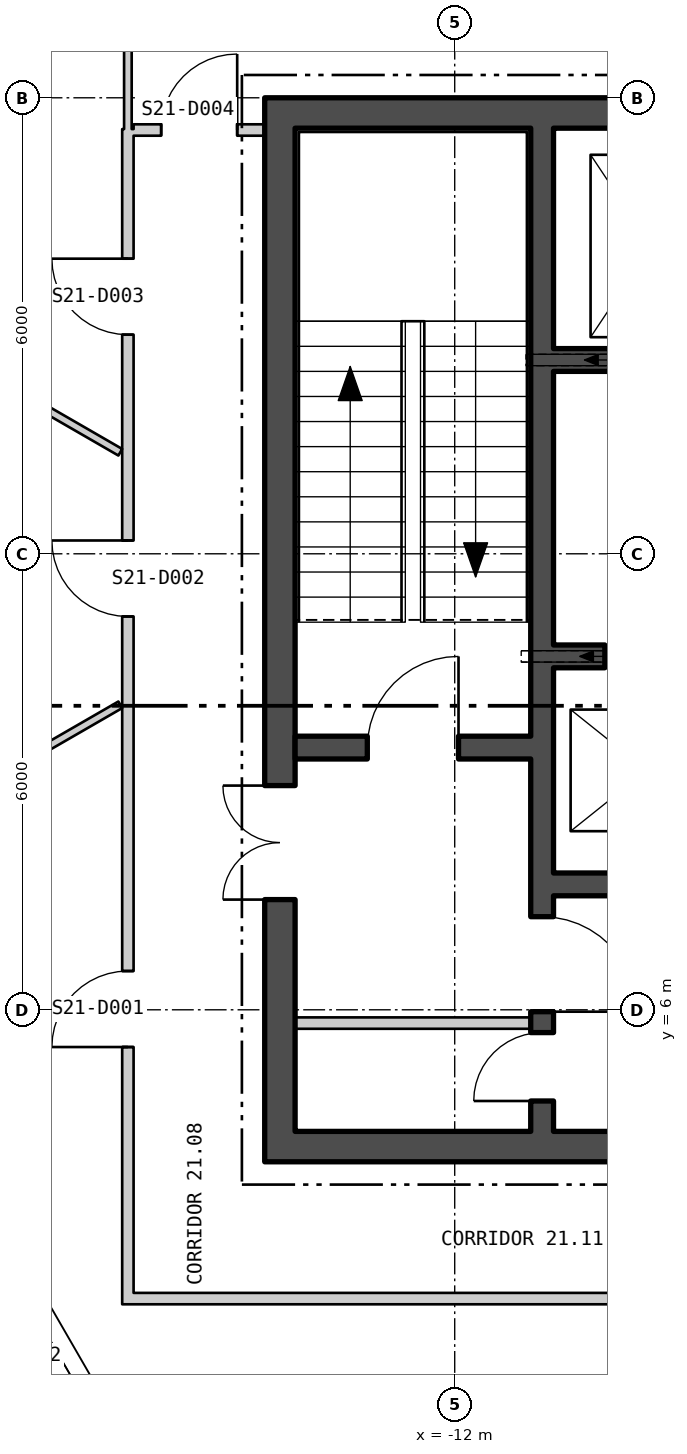
"""IFC4 building model, lengths in metres.
Left out: names, types, materials, properties, quantities, classifications, styles, units other than length and angle.
Written with IfcOpenShell. Run it as: python <this file> out.ifc"""

import sys

from ifc_helpers import new_model, si_unit, direction, frame, frame_2d, origin, place, context, subcontext, project, spatial, polyline, rectangle, outline, extrude, element, fill, save


model = new_model("IFC4")
c1 = context("Model", 3, precision=1e-05, world=origin(), true_north=direction((0.0, 1.0)))
c2 = subcontext(c1, "Body", "Model", "MODEL_VIEW")
j1 = project(units=[si_unit("LENGTHUNIT", "METRE"), si_unit("PLANEANGLEUNIT", "RADIAN")], contexts=[c1])
p1 = place(None, origin())
s1 = spatial("IfcSite", under=j1, at=p1, CompositionType="ELEMENT")
p2 = place(p1, origin())
s2 = spatial("IfcBuilding", under=s1, at=p2, CompositionType="ELEMENT")
p3 = place(p2, frame((0.0, 0.0, 280.5)))
s3 = spatial("IfcBuildingStorey", under=s2, at=p3, CompositionType="ELEMENT", Elevation=280.5)
p4 = place(p3, frame((-25.385, 15.619, -0.18), z_axis=(0.0, 0.0, 1.0), x_axis=(0.500000711659, -0.866024992908, 0.0)))
e1 = element("IfcWall", 1, at=p4, inside=s3, PredefinedType="SOLIDWALL", context=c2, shape_type="SweptSolid", body=[
    extrude(outline(polyline([(-0.13, -0.225), (45.87, -0.225), (45.61, 0.225), (0.13, 0.225), (-0.13, -0.225)])), origin(), (0.0, 0.0, 1.0), 3.68),
])
p5 = place(p4, frame((1.424, 0.0, 1.08)))
e2 = element("IfcOpeningElement", 2, at=p5, cuts=e1, PredefinedType="OPENING", context=c2, shape_type="SweptSolid", body=[
    extrude(rectangle(XDim=2.4, YDim=2.0, at=frame_2d((1.2, 1.0))), frame((0.0, 0.235, 0.0), z_axis=(0.0, -1.0, 0.0), x_axis=(1.0, 0.0, 0.0)), (0.0, 0.0, 1.0), 0.47),
])
p6 = place(p4, frame((5.893, 0.0, 1.08)))
e3 = element("IfcOpeningElement", 3, at=p6, cuts=e1, PredefinedType="OPENING", context=c2, shape_type="SweptSolid", body=[
    extrude(rectangle(XDim=2.4, YDim=2.0, at=frame_2d((1.2, 1.0))), frame((0.0, 0.235, 0.0), z_axis=(0.0, -1.0, 0.0), x_axis=(1.0, 0.0, 0.0)), (0.0, 0.0, 1.0), 0.47),
])
p7 = place(p4, frame((10.401, 0.0, 1.08)))
e4 = element("IfcOpeningElement", 4, at=p7, cuts=e1, PredefinedType="OPENING", context=c2, shape_type="SweptSolid", body=[
    extrude(rectangle(XDim=2.4, YDim=2.0, at=frame_2d((1.2, 1.0))), frame((0.0, 0.235, 0.0), z_axis=(0.0, -1.0, 0.0), x_axis=(1.0, 0.0, 0.0)), (0.0, 0.0, 1.0), 0.47),
])
p8 = place(p4, frame((14.909, 0.0, 1.08)))
e5 = element("IfcOpeningElement", 5, at=p8, cuts=e1, PredefinedType="OPENING", context=c2, shape_type="SweptSolid", body=[
    extrude(rectangle(XDim=2.4, YDim=2.0, at=frame_2d((1.2, 1.0))), frame((0.0, 0.235, 0.0), z_axis=(0.0, -1.0, 0.0), x_axis=(1.0, 0.0, 0.0)), (0.0, 0.0, 1.0), 0.47),
])
p9 = place(p4, frame((19.416, 0.0, 1.08)))
e6 = element("IfcOpeningElement", 6, at=p9, cuts=e1, PredefinedType="OPENING", context=c2, shape_type="SweptSolid", body=[
    extrude(rectangle(XDim=2.4, YDim=2.0, at=frame_2d((1.2, 1.0))), frame((0.0, 0.235, 0.0), z_axis=(0.0, -1.0, 0.0), x_axis=(1.0, 0.0, 0.0)), (0.0, 0.0, 1.0), 0.47),
])
p10 = place(p4, frame((23.924, 0.0, 1.08)))
e7 = element("IfcOpeningElement", 7, at=p10, cuts=e1, PredefinedType="OPENING", context=c2, shape_type="SweptSolid", body=[
    extrude(rectangle(XDim=2.4, YDim=2.0, at=frame_2d((1.2, 1.0))), frame((0.0, 0.235, 0.0), z_axis=(0.0, -1.0, 0.0), x_axis=(1.0, 0.0, 0.0)), (0.0, 0.0, 1.0), 0.47),
])
p11 = place(p4, frame((28.431, 0.0, 1.08)))
e8 = element("IfcOpeningElement", 8, at=p11, cuts=e1, PredefinedType="OPENING", context=c2, shape_type="SweptSolid", body=[
    extrude(rectangle(XDim=2.4, YDim=2.0, at=frame_2d((1.2, 1.0))), frame((0.0, 0.235, 0.0), z_axis=(0.0, -1.0, 0.0), x_axis=(1.0, 0.0, 0.0)), (0.0, 0.0, 1.0), 0.47),
])
p12 = place(p4, frame((32.939, 0.0, 1.08)))
e9 = element("IfcOpeningElement", 9, at=p12, cuts=e1, PredefinedType="OPENING", context=c2, shape_type="SweptSolid", body=[
    extrude(rectangle(XDim=2.4, YDim=2.0, at=frame_2d((1.2, 1.0))), frame((0.0, 0.235, 0.0), z_axis=(0.0, -1.0, 0.0), x_axis=(1.0, 0.0, 0.0)), (0.0, 0.0, 1.0), 0.47),
])
p13 = place(p4, frame((37.447, 0.0, 1.08)))
e10 = element("IfcOpeningElement", 10, at=p13, cuts=e1, PredefinedType="OPENING", context=c2, shape_type="SweptSolid", body=[
    extrude(rectangle(XDim=2.4, YDim=2.0, at=frame_2d((1.2, 1.0))), frame((0.0, 0.235, 0.0), z_axis=(0.0, -1.0, 0.0), x_axis=(1.0, 0.0, 0.0)), (0.0, 0.0, 1.0), 0.47),
])
p14 = place(p4, frame((41.916, 0.0, 1.08)))
e11 = element("IfcOpeningElement", 11, at=p14, cuts=e1, PredefinedType="OPENING", context=c2, shape_type="SweptSolid", body=[
    extrude(rectangle(XDim=2.4, YDim=2.0, at=frame_2d((1.2, 1.0))), frame((0.0, 0.235, 0.0), z_axis=(0.0, -1.0, 0.0), x_axis=(1.0, 0.0, 0.0)), (0.0, 0.0, 1.0), 0.47),
])
p15 = place(p3, frame((-14.5, 4.2, 0.0), z_axis=(0.0, 0.0, 1.0), x_axis=(1.0, 0.0, 0.0)))
e12 = element("IfcWall", 12, at=p15, inside=s3, PredefinedType="SHEAR", context=c2, shape_type="SweptSolid", body=[
    extrude(rectangle(XDim=29.0, YDim=0.4, at=frame_2d((14.5, 0.0))), origin(), (0.0, 0.0, 1.0), 3.7),
])
p16 = place(p15, frame((9.0, 0.0, 0.0)))
e13 = element("IfcOpeningElement", 13, at=p16, cuts=e12, PredefinedType="OPENING", context=c2, shape_type="SweptSolid", body=[
    extrude(rectangle(XDim=1.8, YDim=2.4, at=frame_2d((0.9, 1.2))), frame((0.0, 0.21, 0.0), z_axis=(0.0, -1.0, 0.0), x_axis=(1.0, 0.0, 0.0)), (0.0, 0.0, 1.0), 0.42),
])
p17 = place(p15, frame((19.0, 0.0, 0.0)))
e14 = element("IfcOpeningElement", 14, at=p17, cuts=e12, PredefinedType="OPENING", context=c2, shape_type="SweptSolid", body=[
    extrude(rectangle(XDim=1.8, YDim=2.4, at=frame_2d((0.9, 1.2))), frame((0.0, 0.21, 0.0), z_axis=(0.0, -1.0, 0.0), x_axis=(1.0, 0.0, 0.0)), (0.0, 0.0, 1.0), 0.42),
])
p18 = place(p3, frame((-14.5, 17.8, 0.0), z_axis=(0.0, 0.0, 1.0), x_axis=(1.0, 0.0, 0.0)))
e15 = element("IfcWall", 15, at=p18, inside=s3, PredefinedType="SHEAR", context=c2, shape_type="SweptSolid", body=[
    extrude(rectangle(XDim=29.0, YDim=0.4, at=frame_2d((14.5, 0.0))), origin(), (0.0, 0.0, 1.0), 3.7),
])
p19 = place(p3, frame((-14.3, 4.4, 0.0), z_axis=(0.0, 0.0, 1.0), x_axis=(0.0, 1.0, 0.0)))
e16 = element("IfcWall", 16, at=p19, inside=s3, PredefinedType="SHEAR", context=c2, shape_type="SweptSolid", body=[
    extrude(rectangle(XDim=13.2, YDim=0.4, at=frame_2d((6.6, 0.0))), origin(), (0.0, 0.0, 1.0), 3.7),
])
p20 = place(p19, frame((3.05, 0.0, 0.0)))
e17 = element("IfcOpeningElement", 17, at=p20, cuts=e16, PredefinedType="OPENING", context=c2, shape_type="SweptSolid", body=[
    extrude(rectangle(XDim=1.5, YDim=2.1, at=frame_2d((0.75, 1.05))), frame((0.0, 0.21, 0.0), z_axis=(0.0, -1.0, 0.0), x_axis=(1.0, 0.0, 0.0)), (0.0, 0.0, 1.0), 0.42),
])
p21 = place(p3, frame((-10.85, 4.4, 0.0), z_axis=(0.0, 0.0, 1.0), x_axis=(0.0, 1.0, 0.0)))
e18 = element("IfcWall", 18, at=p21, inside=s3, PredefinedType="SHEAR", context=c2, shape_type="SweptSolid", body=[
    extrude(rectangle(XDim=13.2, YDim=0.3, at=frame_2d((6.6, 0.0))), origin(), (0.0, 0.0, 1.0), 3.7),
])
p22 = place(p21, frame((1.575, 0.0, 0.0)))
e19 = element("IfcOpeningElement", 19, at=p22, cuts=e18, PredefinedType="OPENING", context=c2, shape_type="SweptSolid", body=[
    extrude(rectangle(XDim=1.25, YDim=2.1, at=frame_2d((0.625, 1.05))), frame((0.0, 0.16, 0.0), z_axis=(0.0, -1.0, 0.0), x_axis=(1.0, 0.0, 0.0)), (0.0, 0.0, 1.0), 0.32),
])
p23 = place(p21, frame((0.4, 0.0, 0.0)))
e20 = element("IfcOpeningElement", 20, at=p23, cuts=e18, PredefinedType="OPENING", context=c2, shape_type="SweptSolid", body=[
    extrude(rectangle(XDim=0.9, YDim=2.1, at=frame_2d((0.45, 1.05))), frame((0.0, 0.16, 0.0), z_axis=(0.0, -1.0, 0.0), x_axis=(1.0, 0.0, 0.0)), (0.0, 0.0, 1.0), 0.32),
])
p24 = place(p3, frame((-14.1, 9.45, 0.0), z_axis=(0.0, 0.0, 1.0), x_axis=(1.0, 0.0, 0.0)))
e21 = element("IfcWall", 21, at=p24, inside=s3, PredefinedType="SHEAR", context=c2, shape_type="SweptSolid", body=[
    extrude(rectangle(XDim=3.1, YDim=0.3, at=frame_2d((1.55, 0.0))), origin(), (0.0, 0.0, 1.0), 3.7),
])
p25 = place(p24, frame((0.95, 0.0, 0.0)))
e22 = element("IfcOpeningElement", 22, at=p25, cuts=e21, PredefinedType="OPENING", context=c2, shape_type="SweptSolid", body=[
    extrude(rectangle(XDim=1.2, YDim=2.1, at=frame_2d((0.6, 1.05))), frame((0.0, 0.16, 0.0), z_axis=(0.0, -1.0, 0.0), x_axis=(1.0, 0.0, 0.0)), (0.0, 0.0, 1.0), 0.32),
])
p26 = place(p3, frame((-10.7, 14.55, 0.0), z_axis=(0.0, 0.0, 1.0), x_axis=(1.0, 0.0, 0.0)))
e23 = element("IfcWall", 23, at=p26, inside=s3, PredefinedType="SHEAR", context=c2, shape_type="SweptSolid", body=[
    extrude(rectangle(XDim=21.4, YDim=0.3, at=frame_2d((10.7, 0.0))), origin(), (0.0, 0.0, 1.0), 3.7),
])
p27 = place(p26, frame((0.738, 0.0, 0.0)))
e24 = element("IfcOpeningElement", 24, at=p27, cuts=e23, PredefinedType="OPENING", context=c2, shape_type="SweptSolid", body=[
    extrude(rectangle(XDim=1.1, YDim=2.1, at=frame_2d((0.55, 1.05))), frame((0.0, 0.16, 0.0), z_axis=(0.0, -1.0, 0.0), x_axis=(1.0, 0.0, 0.0)), (0.0, 0.0, 1.0), 0.32),
])
p28 = place(p26, frame((3.462, 0.0, 0.0)))
e25 = element("IfcOpeningElement", 25, at=p28, cuts=e23, PredefinedType="OPENING", context=c2, shape_type="SweptSolid", body=[
    extrude(rectangle(XDim=1.1, YDim=2.1, at=frame_2d((0.55, 1.05))), frame((0.0, 0.16, 0.0), z_axis=(0.0, -1.0, 0.0), x_axis=(1.0, 0.0, 0.0)), (0.0, 0.0, 1.0), 0.32),
])
p29 = place(p26, frame((6.138, 0.0, 0.0)))
e26 = element("IfcOpeningElement", 26, at=p29, cuts=e23, PredefinedType="OPENING", context=c2, shape_type="SweptSolid", body=[
    extrude(rectangle(XDim=1.1, YDim=2.1, at=frame_2d((0.55, 1.05))), frame((0.0, 0.16, 0.0), z_axis=(0.0, -1.0, 0.0), x_axis=(1.0, 0.0, 0.0)), (0.0, 0.0, 1.0), 0.32),
])
p30 = place(p26, frame((8.812, 0.0, 0.0)))
e27 = element("IfcOpeningElement", 27, at=p30, cuts=e23, PredefinedType="OPENING", context=c2, shape_type="SweptSolid", body=[
    extrude(rectangle(XDim=1.1, YDim=2.1, at=frame_2d((0.55, 1.05))), frame((0.0, 0.16, 0.0), z_axis=(0.0, -1.0, 0.0), x_axis=(1.0, 0.0, 0.0)), (0.0, 0.0, 1.0), 0.32),
])
p31 = place(p26, frame((19.562, 0.0, 0.0)))
e28 = element("IfcOpeningElement", 28, at=p31, cuts=e23, PredefinedType="OPENING", context=c2, shape_type="SweptSolid", body=[
    extrude(rectangle(XDim=1.1, YDim=2.1, at=frame_2d((0.55, 1.05))), frame((0.0, 0.16, 0.0), z_axis=(0.0, -1.0, 0.0), x_axis=(1.0, 0.0, 0.0)), (0.0, 0.0, 1.0), 0.32),
])
p32 = place(p26, frame((11.537, 0.0, 0.0)))
e29 = element("IfcOpeningElement", 29, at=p32, cuts=e23, PredefinedType="OPENING", context=c2, shape_type="SweptSolid", body=[
    extrude(rectangle(XDim=1.0, YDim=2.1, at=frame_2d((0.5, 1.05))), frame((0.0, 0.16, 0.0), z_axis=(0.0, -1.0, 0.0), x_axis=(1.0, 0.0, 0.0)), (0.0, 0.0, 1.0), 0.32),
])
p33 = place(p26, frame((14.213, 0.0, 0.0)))
e30 = element("IfcOpeningElement", 30, at=p33, cuts=e23, PredefinedType="OPENING", context=c2, shape_type="SweptSolid", body=[
    extrude(rectangle(XDim=1.0, YDim=2.1, at=frame_2d((0.5, 1.05))), frame((0.0, 0.16, 0.0), z_axis=(0.0, -1.0, 0.0), x_axis=(1.0, 0.0, 0.0)), (0.0, 0.0, 1.0), 0.32),
])
p34 = place(p26, frame((16.887, 0.0, 0.0)))
e31 = element("IfcOpeningElement", 31, at=p34, cuts=e23, PredefinedType="OPENING", context=c2, shape_type="SweptSolid", body=[
    extrude(rectangle(XDim=1.0, YDim=2.1, at=frame_2d((0.5, 1.05))), frame((0.0, 0.16, 0.0), z_axis=(0.0, -1.0, 0.0), x_axis=(1.0, 0.0, 0.0)), (0.0, 0.0, 1.0), 0.32),
])
p35 = place(p3, frame((-10.7, 10.65, 0.0), z_axis=(0.0, 0.0, 1.0), x_axis=(1.0, 0.0, 0.0)))
e32 = element("IfcWall", 32, at=p35, inside=s3, PredefinedType="SHEAR", context=c2, shape_type="SweptSolid", body=[
    extrude(rectangle(XDim=10.3, YDim=0.3, at=frame_2d((5.15, 0.0))), origin(), (0.0, 0.0, 1.0), 3.7),
])
p36 = place(p35, frame((0.675, 0.0, 0.0)))
e33 = element("IfcOpeningElement", 33, at=p36, cuts=e32, PredefinedType="OPENING", context=c2, shape_type="SweptSolid", body=[
    extrude(rectangle(XDim=1.1, YDim=2.1, at=frame_2d((0.55, 1.05))), frame((0.0, 0.16, 0.0), z_axis=(0.0, -1.0, 0.0), x_axis=(1.0, 0.0, 0.0)), (0.0, 0.0, 1.0), 0.32),
])
p37 = place(p35, frame((3.275, 0.0, 0.0)))
e34 = element("IfcOpeningElement", 34, at=p37, cuts=e32, PredefinedType="OPENING", context=c2, shape_type="SweptSolid", body=[
    extrude(rectangle(XDim=1.1, YDim=2.1, at=frame_2d((0.55, 1.05))), frame((0.0, 0.16, 0.0), z_axis=(0.0, -1.0, 0.0), x_axis=(1.0, 0.0, 0.0)), (0.0, 0.0, 1.0), 0.32),
])
p38 = place(p35, frame((5.825, 0.0, 0.0)))
e35 = element("IfcOpeningElement", 35, at=p38, cuts=e32, PredefinedType="OPENING", context=c2, shape_type="SweptSolid", body=[
    extrude(rectangle(XDim=1.1, YDim=2.1, at=frame_2d((0.55, 1.05))), frame((0.0, 0.16, 0.0), z_axis=(0.0, -1.0, 0.0), x_axis=(1.0, 0.0, 0.0)), (0.0, 0.0, 1.0), 0.32),
])
p39 = place(p35, frame((8.425, 0.0, 0.0)))
e36 = element("IfcOpeningElement", 36, at=p39, cuts=e32, PredefinedType="OPENING", context=c2, shape_type="SweptSolid", body=[
    extrude(rectangle(XDim=1.0, YDim=2.1, at=frame_2d((0.5, 1.05))), frame((0.0, 0.16, 0.0), z_axis=(0.0, -1.0, 0.0), x_axis=(1.0, 0.0, 0.0)), (0.0, 0.0, 1.0), 0.32),
])
p40 = place(p3, frame((-10.7, 7.65, 0.0), z_axis=(0.0, 0.0, 1.0), x_axis=(1.0, 0.0, 0.0)))
e37 = element("IfcWall", 37, at=p40, inside=s3, PredefinedType="SHEAR", context=c2, shape_type="SweptSolid", body=[
    extrude(rectangle(XDim=10.3, YDim=0.3, at=frame_2d((5.15, 0.0))), origin(), (0.0, 0.0, 1.0), 3.7),
])
p41 = place(p3, frame((-14.1, 5.825, 0.0), z_axis=(0.0, 0.0, 1.0), x_axis=(1.0, 0.0, 0.0)))
e38 = element("IfcWall", 38, at=p41, inside=s3, PredefinedType="PARTITIONING", context=c2, shape_type="SweptSolid", body=[
    extrude(rectangle(XDim=3.1, YDim=0.15, at=frame_2d((1.55, 0.0))), origin(), (0.0, 0.0, 1.0), 3.7),
])
p42 = place(p3, frame((-20.127, 7.862, 0.0), z_axis=(0.0, 0.0, 1.0), x_axis=(0.866104329613, 0.499863271531, 0.0)))
e39 = element("IfcWall", 39, at=p42, inside=s3, PredefinedType="PARTITIONING", context=c2, shape_type="SweptSolid", body=[
    extrude(rectangle(XDim=4.303, YDim=0.1, at=frame_2d((2.152, 0.0))), origin(), (0.0, 0.0, 1.0), 3.7),
])
p43 = place(p3, frame((-17.971, 14.243, 0.0), z_axis=(0.0, 0.0, 1.0), x_axis=(0.86602952684, -0.49999285859, 0.0)))
e40 = element("IfcWall", 40, at=p43, inside=s3, PredefinedType="PARTITIONING", context=c2, shape_type="SweptSolid", body=[
    extrude(rectangle(XDim=1.814, YDim=0.1, at=frame_2d((0.907, 0.0))), origin(), (0.0, 0.0, 1.0), 3.7),
])
p44 = place(p3, frame((-16.3, 2.125, 0.0), z_axis=(0.0, 0.0, 1.0), x_axis=(0.0, 1.0, 0.0)))
e41 = element("IfcWall", 41, at=p44, inside=s3, PredefinedType="PARTITIONING", context=c2, shape_type="SweptSolid", body=[
    extrude(rectangle(XDim=15.463, YDim=0.15, at=frame_2d((7.731, 0.0))), origin(), (0.0, 0.0, 1.0), 3.7),
])
p45 = place(p44, frame((3.385, 0.0, 0.0)))
e42 = element("IfcOpeningElement", 42, at=p45, cuts=e41, PredefinedType="OPENING", context=c2, shape_type="SweptSolid", body=[
    extrude(rectangle(XDim=1.0, YDim=2.1, at=frame_2d((0.5, 1.05))), frame((0.0, 0.085, 0.0), z_axis=(0.0, -1.0, 0.0), x_axis=(1.0, 0.0, 0.0)), (0.0, 0.0, 1.0), 0.17),
])
p46 = place(p44, frame((9.05, 0.0, 0.0)))
e43 = element("IfcOpeningElement", 43, at=p46, cuts=e41, PredefinedType="OPENING", context=c2, shape_type="SweptSolid", body=[
    extrude(rectangle(XDim=1.0, YDim=2.1, at=frame_2d((0.5, 1.05))), frame((0.0, 0.085, 0.0), z_axis=(0.0, -1.0, 0.0), x_axis=(1.0, 0.0, 0.0)), (0.0, 0.0, 1.0), 0.17),
])
p47 = place(p44, frame((12.758, 0.0, 0.0)))
e44 = element("IfcOpeningElement", 44, at=p47, cuts=e41, PredefinedType="OPENING", context=c2, shape_type="SweptSolid", body=[
    extrude(rectangle(XDim=1.0, YDim=2.1, at=frame_2d((0.5, 1.05))), frame((0.0, 0.085, 0.0), z_axis=(0.0, -1.0, 0.0), x_axis=(1.0, 0.0, 0.0)), (0.0, 0.0, 1.0), 0.17),
])
p48 = place(p3, frame((-16.3, 17.588, 0.0), z_axis=(0.0, 0.0, 1.0), x_axis=(0.0, 1.0, 0.0)))
e45 = element("IfcWall", 45, at=p48, inside=s3, PredefinedType="PARTITIONING", context=c2, shape_type="SweptSolid", body=[
    extrude(rectangle(XDim=2.162, YDim=0.1, at=frame_2d((1.081, 0.0))), origin(), (0.0, 0.0, 1.0), 3.7),
])
p49 = place(p3, frame((-16.225, 2.2, 0.0), z_axis=(0.0, 0.0, 1.0), x_axis=(1.0, 0.0, 0.0)))
e46 = element("IfcWall", 46, at=p49, inside=s3, PredefinedType="PARTITIONING", context=c2, shape_type="SweptSolid", body=[
    extrude(rectangle(XDim=8.503, YDim=0.15, at=frame_2d((4.252, 0.0))), origin(), (0.0, 0.0, 1.0), 3.7),
])
p50 = place(p3, frame((-16.225, 17.576, 0.0), z_axis=(0.0, 0.0, 1.0), x_axis=(1.0, 0.0, 0.0)))
e47 = element("IfcWall", 47, at=p50, inside=s3, PredefinedType="PARTITIONING", context=c2, shape_type="SweptSolid", body=[
    extrude(rectangle(XDim=1.725, YDim=0.15, at=frame_2d((0.863, 0.0))), origin(), (0.0, 0.0, 1.0), 3.7),
])
p51 = place(p50, frame((0.363, 0.0, 0.0)))
e48 = element("IfcOpeningElement", 48, at=p51, cuts=e47, PredefinedType="OPENING", context=c2, shape_type="SweptSolid", body=[
    extrude(rectangle(XDim=1.0, YDim=2.1, at=frame_2d((0.5, 1.05))), frame((0.0, 0.085, 0.0), z_axis=(0.0, -1.0, 0.0), x_axis=(1.0, 0.0, 0.0)), (0.0, 0.0, 1.0), 0.17),
])
p52 = place(p8, origin())
e49 = element("IfcWindow", 49, at=p52, inside=s3, PartitioningType="SINGLE_PANEL", PredefinedType="WINDOW", context=c2, shape_type="SweptSolid", body=[
    extrude(rectangle(XDim=2.4, YDim=2.0, at=frame_2d((1.2, 1.0))), frame((0.0, 0.105, 0.0), z_axis=(0.0, -1.0, 0.0), x_axis=(1.0, 0.0, 0.0)), (0.0, 0.0, 1.0), 0.06),
])
fill(e5, e49)
p53 = place(p36, origin())
e50 = element("IfcDoor", 50, at=p53, inside=s3, OperationType="SLIDING_TO_LEFT", PredefinedType="DOOR", context=c2, shape_type="SweptSolid", body=[
    extrude(rectangle(XDim=1.1, YDim=2.1, at=frame_2d((0.55, 1.05))), frame((0.0, 0.025, 0.0), z_axis=(0.0, -1.0, 0.0), x_axis=(1.0, 0.0, 0.0)), (0.0, 0.0, 1.0), 0.05),
])
fill(e33, e50)
p54 = place(p25, origin())
e51 = element("IfcDoor", 51, at=p54, inside=s3, OperationType="SINGLE_SWING_LEFT", PredefinedType="DOOR", context=c2, shape_type="SweptSolid", body=[
    extrude(rectangle(XDim=1.2, YDim=2.1, at=frame_2d((0.6, 1.05))), frame((0.0, 0.025, 0.0), z_axis=(0.0, -1.0, 0.0), x_axis=(1.0, 0.0, 0.0)), (0.0, 0.0, 1.0), 0.05),
])
fill(e22, e51)
p55 = place(p22, origin())
e52 = element("IfcDoor", 52, at=p55, inside=s3, OperationType="SINGLE_SWING_LEFT", PredefinedType="DOOR", context=c2, shape_type="SweptSolid", body=[
    extrude(rectangle(XDim=1.25, YDim=2.1, at=frame_2d((0.625, 1.05))), frame((0.0, 0.025, 0.0), z_axis=(0.0, -1.0, 0.0), x_axis=(1.0, 0.0, 0.0)), (0.0, 0.0, 1.0), 0.05),
])
fill(e19, e52)
p56 = place(p20, origin())
e53 = element("IfcDoor", 53, at=p56, inside=s3, OperationType="DOUBLE_DOOR_SINGLE_SWING", PredefinedType="DOOR", context=c2, shape_type="SweptSolid", body=[
    extrude(rectangle(XDim=1.5, YDim=2.1, at=frame_2d((0.75, 1.05))), frame((0.0, 0.025, 0.0), z_axis=(0.0, -1.0, 0.0), x_axis=(1.0, 0.0, 0.0)), (0.0, 0.0, 1.0), 0.05),
])
fill(e17, e53)
p57 = place(p23, origin())
e54 = element("IfcDoor", 54, at=p57, inside=s3, OperationType="SINGLE_SWING_RIGHT", PredefinedType="DOOR", context=c2, shape_type="SweptSolid", body=[
    extrude(rectangle(XDim=0.9, YDim=2.1, at=frame_2d((0.45, 1.05))), frame((0.0, 0.025, 0.0), z_axis=(0.0, -1.0, 0.0), x_axis=(1.0, 0.0, 0.0)), (0.0, 0.0, 1.0), 0.05),
])
fill(e20, e54)
p58 = place(p45, origin())
e55 = element("IfcDoor", 55, at=p58, inside=s3, OperationType="SINGLE_SWING_RIGHT", PredefinedType="DOOR", context=c2, shape_type="SweptSolid", body=[
    extrude(rectangle(XDim=1.0, YDim=2.1, at=frame_2d((0.5, 1.05))), frame((0.0, 0.025, 0.0), z_axis=(0.0, -1.0, 0.0), x_axis=(1.0, 0.0, 0.0)), (0.0, 0.0, 1.0), 0.05),
])
fill(e42, e55)
p59 = place(p46, origin())
e56 = element("IfcDoor", 56, at=p59, inside=s3, OperationType="SINGLE_SWING_LEFT", PredefinedType="DOOR", context=c2, shape_type="SweptSolid", body=[
    extrude(rectangle(XDim=1.0, YDim=2.1, at=frame_2d((0.5, 1.05))), frame((0.0, 0.025, 0.0), z_axis=(0.0, -1.0, 0.0), x_axis=(1.0, 0.0, 0.0)), (0.0, 0.0, 1.0), 0.05),
])
fill(e43, e56)
p60 = place(p47, origin())
e57 = element("IfcDoor", 57, at=p60, inside=s3, OperationType="SINGLE_SWING_LEFT", PredefinedType="DOOR", context=c2, shape_type="SweptSolid", body=[
    extrude(rectangle(XDim=1.0, YDim=2.1, at=frame_2d((0.5, 1.05))), frame((0.0, 0.025, 0.0), z_axis=(0.0, -1.0, 0.0), x_axis=(1.0, 0.0, 0.0)), (0.0, 0.0, 1.0), 0.05),
])
fill(e44, e57)
p61 = place(p51, origin())
e58 = element("IfcDoor", 58, at=p61, inside=s3, OperationType="SINGLE_SWING_LEFT", PredefinedType="DOOR", context=c2, shape_type="SweptSolid", body=[
    extrude(rectangle(XDim=1.0, YDim=2.1, at=frame_2d((0.5, 1.05))), frame((0.0, 0.025, 0.0), z_axis=(0.0, -1.0, 0.0), x_axis=(1.0, 0.0, 0.0)), (0.0, 0.0, 1.0), 0.05),
])
fill(e48, e58)
save(model, sys.argv[1])
